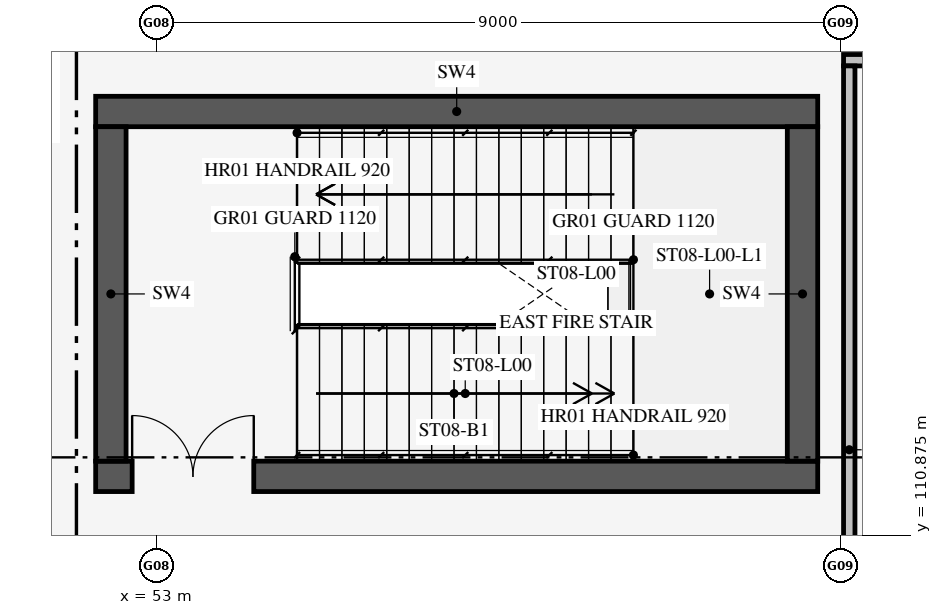
"""IFC4 building model, lengths in metres.
Left out: names, types, materials, properties, quantities, classifications, styles, units other than length and angle.
Written with IfcOpenShell. Run it as: python <this file> out.ifc"""

import sys

from ifc_helpers import new_model, si_unit, direction, frame, frame_2d, origin, place, context, subcontext, project, spatial, rectangle, extrude, element, fill, save


model = new_model("IFC4")
c1 = context("Model", 3, precision=1e-05, world=origin(), true_north=direction((0.0, 1.0)))
c2 = subcontext(c1, "Body", "Model", "MODEL_VIEW")
j1 = project(units=[si_unit("LENGTHUNIT", "METRE"), si_unit("PLANEANGLEUNIT", "RADIAN")], contexts=[c1])
p1 = place(None, origin())
s1 = spatial("IfcSite", under=j1, at=p1, CompositionType="ELEMENT")
p2 = place(p1, origin())
s2 = spatial("IfcBuilding", under=s1, at=p2, CompositionType="ELEMENT")
p3 = place(p2, origin())
s3 = spatial("IfcBuildingStorey", under=s2, at=p3, CompositionType="ELEMENT", Elevation=0.0)
p4 = place(p3, frame((52.2, 111.65, 0.0), z_axis=(0.0, 0.0, 1.0), x_axis=(1.0, 0.0, 0.0)))
e1 = element("IfcWall", 1, at=p4, inside=s3, PredefinedType="SHEAR", context=c2, shape_type="SweptSolid", body=[
    extrude(rectangle(XDim=9.5, YDim=0.4, at=frame_2d((4.75, 0.0))), origin(), (0.0, 0.0, 1.0), 5.16),
])
p5 = place(p4, frame((0.48, 0.0, 0.0)))
e2 = element("IfcOpeningElement", 2, at=p5, cuts=e1, PredefinedType="OPENING", context=c2, shape_type="SweptSolid", body=[
    extrude(rectangle(XDim=1.6, YDim=2.2, at=frame_2d((0.8, 1.1))), frame((0.0, 0.212, 0.0), z_axis=(0.0, -1.0, 0.0), x_axis=(1.0, 0.0, 0.0)), (0.0, 0.0, 1.0), 0.424),
])
p6 = place(p3, frame((52.2, 116.45, 0.0), z_axis=(0.0, 0.0, 1.0), x_axis=(1.0, 0.0, 0.0)))
e3 = element("IfcWall", 3, at=p6, inside=s3, PredefinedType="SHEAR", context=c2, shape_type="SweptSolid", body=[
    extrude(rectangle(XDim=9.5, YDim=0.4, at=frame_2d((4.75, 0.0))), origin(), (0.0, 0.0, 1.0), 5.16),
])
for number, where, z_axis, x_axis in (
    (4, (52.4, 111.85, 0.0), (0.0, 0.0, 1.0), (0.0, 1.0, 0.0)),
    (5, (61.5, 111.85, 0.0), (0.0, 0.0, 1.0), (0.0, 1.0, 0.0)),
):
    element("IfcWall", number, at=place(p3, frame(where, z_axis=z_axis, x_axis=x_axis)), inside=s3, PredefinedType="SHEAR", context=c2, shape_type="SweptSolid", body=[
        extrude(rectangle(XDim=4.4, YDim=0.4, at=frame_2d((2.2, 0.0))), origin(), (0.0, 0.0, 1.0), 5.16),
    ])
p7 = place(p3, frame((62.04, 117.125, 0.0), z_axis=(0.0, 0.0, 1.0), x_axis=(1.0, 0.0, 0.0)))
e6 = element("IfcWall", 6, at=p7, inside=s3, PredefinedType="PARTITIONING", context=c2, shape_type="SweptSolid", body=[
    extrude(rectangle(XDim=8.653, YDim=0.15, at=frame_2d((4.327, 0.0))), origin(), (0.0, 0.0, 1.0), 5.145),
])
p8 = place(p3, frame((62.115, 106.95, 0.0), z_axis=(0.0, 0.0, 1.0), x_axis=(0.0, 1.0, 0.0)))
e7 = element("IfcWall", 7, at=p8, inside=s3, PredefinedType="PARTITIONING", context=c2, shape_type="SweptSolid", body=[
    extrude(rectangle(XDim=10.1, YDim=0.15, at=frame_2d((5.05, 0.0))), origin(), (0.0, 0.0, 1.0), 4.211),
])
p9 = place(p5, frame((1.6, 0.0, 0.0), z_axis=(0.0, 0.0, 1.0), x_axis=(-1.0, 0.0, 0.0)))
e8 = element("IfcDoor", 8, at=p9, inside=s3, OperationType="DOUBLE_DOOR_SINGLE_SWING", PredefinedType="DOOR", context=c2, shape_type="SweptSolid", body=[
    extrude(rectangle(XDim=1.6, YDim=2.2, at=frame_2d((0.8, 1.1))), frame((0.0, 0.025, 0.0), z_axis=(0.0, -1.0, 0.0), x_axis=(1.0, 0.0, 0.0)), (0.0, 0.0, 1.0), 0.05),
])
fill(e2, e8)
save(model, sys.argv[1])
